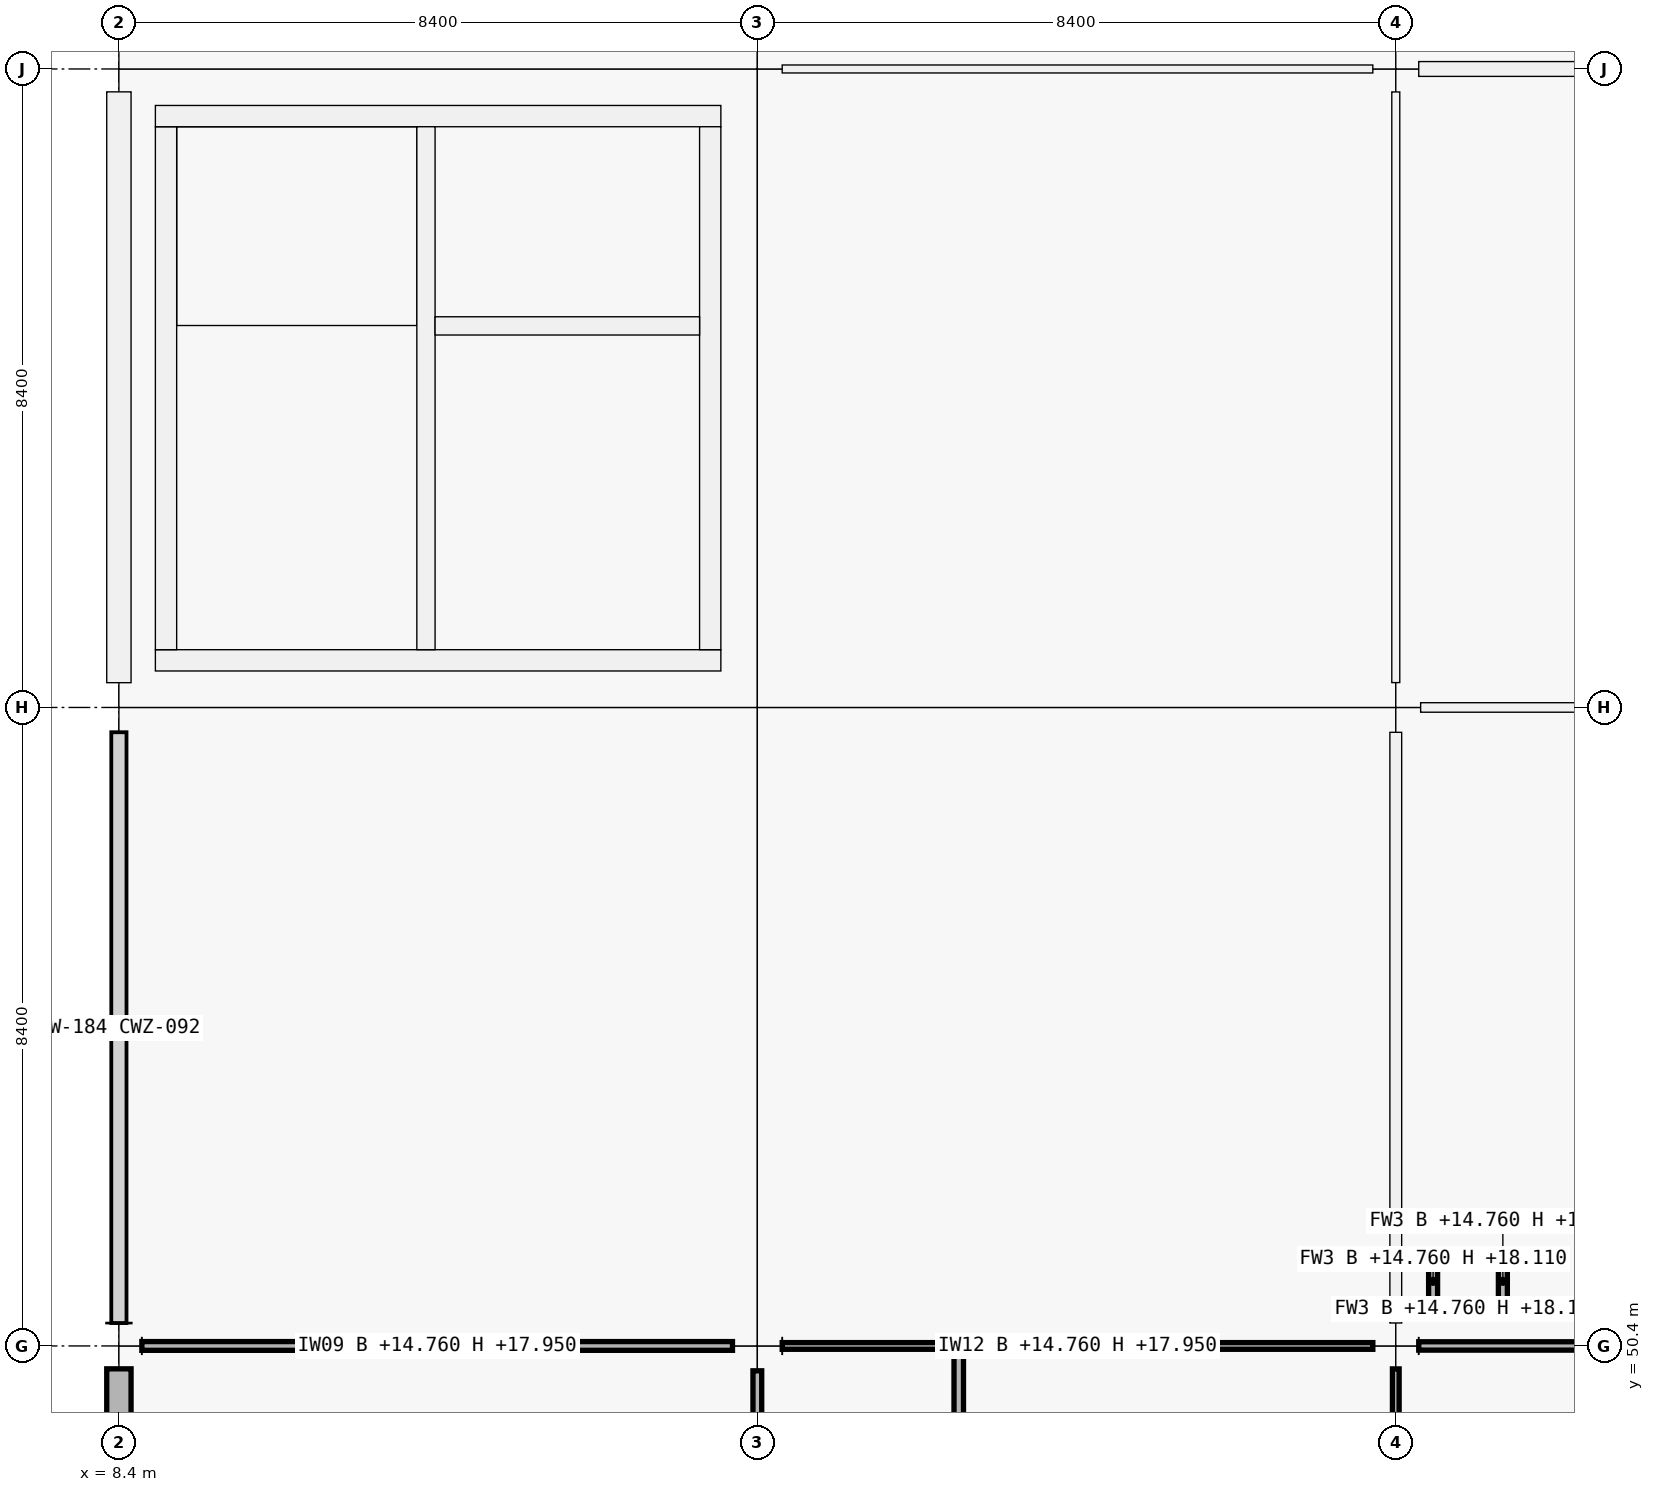
"""IFC4 building model, lengths in metres.
Left out: names, types, materials, properties, quantities, classifications, styles, units other than length and angle.
Written with IfcOpenShell. Run it as: python <this file> out.ifc"""

import sys

from ifc_helpers import new_model, si_unit, direction, frame, frame_2d, origin, origin_2d, place, context, subcontext, project, spatial, rectangle, extrude, element, fill, save


model = new_model("IFC4")
c1 = context("Model", 3, precision=1e-05, world=origin(), true_north=direction((0.0, 1.0)))
c2 = subcontext(c1, "Body", "Model", "MODEL_VIEW")
j1 = project(units=[si_unit("LENGTHUNIT", "METRE"), si_unit("PLANEANGLEUNIT", "RADIAN")], contexts=[c1])
p1 = place(None, origin())
s1 = spatial("IfcSite", under=j1, at=p1, CompositionType="ELEMENT")
p2 = place(p1, origin())
s2 = spatial("IfcBuilding", under=s1, at=p2, CompositionType="ELEMENT")
p3 = place(p2, frame((0.0, 0.0, 14.76)))
s3 = spatial("IfcBuildingStorey", under=s2, at=p3, CompositionType="ELEMENT", Elevation=14.76)
p4 = place(p3, frame((8.4, 50.4, 0.0), z_axis=(0.0, 0.0, 1.0), x_axis=(1.0, 0.0, 0.0)))
e1 = element("IfcColumn", 1, at=p4, inside=s3, PredefinedType="COLUMN", context=c2, shape_type="SweptSolid", body=[
    extrude(rectangle(XDim=0.6, YDim=0.6, at=origin_2d()), origin(), (0.0, 0.0, 1.0), 4.32),
])
p5 = place(p3, frame((8.4, 58.8, 0.0), z_axis=(0.0, 0.0, 1.0), x_axis=(1.0, 0.0, 0.0)))
e2 = element("IfcColumn", 2, at=p5, inside=s3, PredefinedType="COLUMN", context=c2, shape_type="SweptSolid", body=[
    extrude(rectangle(XDim=0.65, YDim=0.65, at=origin_2d()), origin(), (0.0, 0.0, 1.0), 4.32),
])
p6 = place(p3, frame((8.4, 67.2, 0.0), z_axis=(0.0, 0.0, 1.0), x_axis=(1.0, 0.0, 0.0)))
e3 = element("IfcColumn", 3, at=p6, inside=s3, PredefinedType="COLUMN", context=c2, shape_type="SweptSolid", body=[
    extrude(rectangle(XDim=0.6, YDim=0.6, at=origin_2d()), origin(), (0.0, 0.0, 1.0), 4.32),
])
p7 = place(p3, frame((16.8, 50.4, 0.0), z_axis=(0.0, 0.0, 1.0), x_axis=(1.0, 0.0, 0.0)))
e4 = element("IfcColumn", 4, at=p7, inside=s3, PredefinedType="COLUMN", context=c2, shape_type="SweptSolid", body=[
    extrude(rectangle(XDim=0.65, YDim=0.65, at=origin_2d()), origin(), (0.0, 0.0, 1.0), 4.32),
])
p8 = place(p3, frame((16.8, 58.8, 0.0), z_axis=(0.0, 0.0, 1.0), x_axis=(1.0, 0.0, 0.0)))
e5 = element("IfcColumn", 5, at=p8, inside=s3, PredefinedType="COLUMN", context=c2, shape_type="SweptSolid", body=[
    extrude(rectangle(XDim=0.6, YDim=0.6, at=origin_2d()), origin(), (0.0, 0.0, 1.0), 4.32),
])
p9 = place(p3, frame((16.8, 67.2, 0.0), z_axis=(0.0, 0.0, 1.0), x_axis=(1.0, 0.0, 0.0)))
e6 = element("IfcColumn", 6, at=p9, inside=s3, PredefinedType="COLUMN", context=c2, shape_type="SweptSolid", body=[
    extrude(rectangle(XDim=0.65, YDim=0.65, at=origin_2d()), origin(), (0.0, 0.0, 1.0), 4.32),
])
p10 = place(p3, frame((25.2, 50.4, 0.0), z_axis=(0.0, 0.0, 1.0), x_axis=(1.0, 0.0, 0.0)))
e7 = element("IfcColumn", 7, at=p10, inside=s3, PredefinedType="COLUMN", context=c2, shape_type="SweptSolid", body=[
    extrude(rectangle(XDim=0.6, YDim=0.6, at=origin_2d()), origin(), (0.0, 0.0, 1.0), 4.32),
])
p11 = place(p3, frame((25.2, 58.8, 0.0), z_axis=(0.0, 0.0, 1.0), x_axis=(1.0, 0.0, 0.0)))
e8 = element("IfcColumn", 8, at=p11, inside=s3, PredefinedType="COLUMN", context=c2, shape_type="SweptSolid", body=[
    extrude(rectangle(XDim=0.65, YDim=0.65, at=origin_2d()), origin(), (0.0, 0.0, 1.0), 4.32),
])
p12 = place(p3, frame((25.2, 67.2, 0.0), z_axis=(0.0, 0.0, 1.0), x_axis=(1.0, 0.0, 0.0)))
e9 = element("IfcColumn", 9, at=p12, inside=s3, PredefinedType="COLUMN", context=c2, shape_type="SweptSolid", body=[
    extrude(rectangle(XDim=0.6, YDim=0.6, at=origin_2d()), origin(), (0.0, 0.0, 1.0), 4.32),
])
p13 = place(p3, frame((8.4, 42.326, 0.0), z_axis=(0.0, 0.0, 1.0), x_axis=(0.0, 1.0, 0.0)))
e10 = element("IfcWall", 10, at=p13, inside=s3, PredefinedType="SOLIDWALL", context=c2, shape_type="SweptSolid", body=[
    extrude(rectangle(XDim=7.773, YDim=0.32, at=frame_2d((3.887, 0.0))), origin(), (0.0, 0.0, 1.0), 3.37),
])
p14 = place(p13, frame((2.536, 0.0, 0.9)))
e11 = element("IfcOpeningElement", 11, at=p14, cuts=e10, PredefinedType="OPENING", context=c2, shape_type="SweptSolid", body=[
    extrude(rectangle(XDim=2.7, YDim=1.2, at=frame_2d((1.35, 0.6))), frame((0.0, 0.16, 0.0), z_axis=(0.0, -1.0, 0.0), x_axis=(1.0, 0.0, 0.0)), (0.0, 0.0, 1.0), 0.32),
])
p15 = place(p3, frame((8.4, 59.126, 0.0), z_axis=(0.0, 0.0, 1.0), x_axis=(0.0, 1.0, 0.0)))
e12 = element("IfcWall", 12, at=p15, inside=s3, PredefinedType="SOLIDWALL", context=c2, shape_type="SweptSolid", body=[
    extrude(rectangle(XDim=7.773, YDim=0.32, at=frame_2d((3.886, 0.0))), origin(), (0.0, 0.0, 1.0), 3.37),
])
p16 = place(p3, frame((16.32, 59.42, 0.0), z_axis=(0.0, 0.0, 1.0), x_axis=(-1.0, 0.0, 0.0)))
e13 = element("IfcWall", 13, at=p16, inside=s3, PredefinedType="SHEAR", context=c2, shape_type="SweptSolid", body=[
    extrude(rectangle(XDim=7.44, YDim=0.28, at=frame_2d((3.72, 0.0))), origin(), (0.0, 0.0, 1.0), 4.32),
])
p17 = place(p16, frame((1.28, 0.0, 0.0)))
e14 = element("IfcOpeningElement", 14, at=p17, cuts=e13, PredefinedType="OPENING", context=c2, shape_type="SweptSolid", body=[
    extrude(rectangle(XDim=1.5, YDim=2.15, at=frame_2d((0.75, 1.075))), frame((0.0, 0.14, 0.0), z_axis=(0.0, -1.0, 0.0), x_axis=(1.0, 0.0, 0.0)), (0.0, 0.0, 1.0), 0.28),
])
p18 = place(p3, frame((9.02, 59.56, 0.0), z_axis=(0.0, 0.0, 1.0), x_axis=(0.0, 1.0, 0.0)))
e15 = element("IfcWall", 15, at=p18, inside=s3, PredefinedType="SHEAR", context=c2, shape_type="SweptSolid", body=[
    extrude(rectangle(XDim=6.88, YDim=0.28, at=frame_2d((3.44, 0.0))), origin(), (0.0, 0.0, 1.0), 4.32),
])
p19 = place(p3, frame((8.88, 66.58, 0.0), z_axis=(0.0, 0.0, 1.0), x_axis=(1.0, 0.0, 0.0)))
e16 = element("IfcWall", 16, at=p19, inside=s3, PredefinedType="SHEAR", context=c2, shape_type="SweptSolid", body=[
    extrude(rectangle(XDim=7.44, YDim=0.28, at=frame_2d((3.72, 0.0))), origin(), (0.0, 0.0, 1.0), 4.32),
])
p20 = place(p3, frame((16.18, 66.44, 0.0), z_axis=(0.0, 0.0, 1.0), x_axis=(0.0, -1.0, 0.0)))
e17 = element("IfcWall", 17, at=p20, inside=s3, PredefinedType="SHEAR", context=c2, shape_type="SweptSolid", body=[
    extrude(rectangle(XDim=6.88, YDim=0.28, at=frame_2d((3.44, 0.0))), origin(), (0.0, 0.0, 1.0), 4.32),
])
p21 = place(p3, frame((12.44, 59.56, 0.0), z_axis=(0.0, 0.0, 1.0), x_axis=(0.0, 1.0, 0.0)))
e18 = element("IfcWall", 18, at=p21, inside=s3, PredefinedType="SHEAR", context=c2, shape_type="SweptSolid", body=[
    extrude(rectangle(XDim=6.88, YDim=0.24, at=frame_2d((3.44, 0.0))), origin(), (0.0, 0.0, 1.0), 4.32),
])
p22 = place(p21, frame((0.12, 0.0, 0.0)))
e19 = element("IfcOpeningElement", 19, at=p22, cuts=e18, PredefinedType="OPENING", context=c2, shape_type="SweptSolid", body=[
    extrude(rectangle(XDim=1.0, YDim=2.15, at=frame_2d((0.5, 1.075))), frame((0.0, 0.12, 0.0), z_axis=(0.0, -1.0, 0.0), x_axis=(1.0, 0.0, 0.0)), (0.0, 0.0, 1.0), 0.24),
])
p23 = place(p3, frame((12.56, 63.82, 0.0), z_axis=(0.0, 0.0, 1.0), x_axis=(1.0, 0.0, 0.0)))
e20 = element("IfcWall", 20, at=p23, inside=s3, PredefinedType="SHEAR", context=c2, shape_type="SweptSolid", body=[
    extrude(rectangle(XDim=3.48, YDim=0.24, at=frame_2d((1.74, 0.0))), origin(), (0.0, 0.0, 1.0), 4.32),
])
p24 = place(p23, frame((1.19, 0.0, 0.0)))
e21 = element("IfcOpeningElement", 21, at=p24, cuts=e20, PredefinedType="OPENING", context=c2, shape_type="SweptSolid", body=[
    extrude(rectangle(XDim=1.1, YDim=2.15, at=frame_2d((0.55, 1.075))), frame((0.0, 0.12, 0.0), z_axis=(0.0, -1.0, 0.0), x_axis=(1.0, 0.0, 0.0)), (0.0, 0.0, 1.0), 0.24),
])
for number, where, z_axis, x_axis in (
    (22, (25.632, 50.891, 0.0), (0.0, 0.0, 1.0), (1.0, 0.0, 0.0)),
    (23, (25.632, 51.609, 0.0), (0.0, 0.0, 1.0), (1.0, 0.0, 0.0)),
):
    element("IfcWall", number, at=place(p3, frame(where, z_axis=z_axis, x_axis=x_axis)), inside=s3, PredefinedType="PARTITIONING", context=c2, shape_type="SweptSolid", body=[
        extrude(rectangle(XDim=1.036, YDim=0.118, at=frame_2d((0.518, 0.0))), origin(), (0.0, 0.0, 1.0), 3.35),
    ])
for number, where, z_axis, x_axis in (
    (24, (25.691, 50.95, 0.0), (0.0, 0.0, 1.0), (0.0, 1.0, 0.0)),
    (25, (26.609, 50.95, 0.0), (0.0, 0.0, 1.0), (0.0, 1.0, 0.0)),
):
    element("IfcWall", number, at=place(p3, frame(where, z_axis=z_axis, x_axis=x_axis)), inside=s3, PredefinedType="PARTITIONING", context=c2, shape_type="SweptSolid", body=[
        extrude(rectangle(XDim=0.6, YDim=0.118, at=frame_2d((0.3, 0.0))), origin(), (0.0, 0.0, 1.0), 3.35),
    ])
p25 = place(p3, frame((8.702, 50.4, 0.0), z_axis=(0.0, 0.0, 1.0), x_axis=(1.0, 0.0, 0.0)))
e26 = element("IfcWall", 26, at=p25, inside=s3, PredefinedType="PARTITIONING", context=c2, shape_type="SweptSolid", body=[
    extrude(rectangle(XDim=7.771, YDim=0.115, at=frame_2d((3.885, 0.0))), origin(), (0.0, 0.0, 1.0), 3.19),
])
p26 = place(p25, frame((3.421, 0.0, 0.0)))
e27 = element("IfcOpeningElement", 27, at=p26, cuts=e26, PredefinedType="OPENING", context=c2, shape_type="SweptSolid", body=[
    extrude(rectangle(XDim=0.93, YDim=2.12, at=frame_2d((0.465, 1.06))), frame((0.0, 0.058, 0.0), z_axis=(0.0, -1.0, 0.0), x_axis=(1.0, 0.0, 0.0)), (0.0, 0.0, 1.0), 0.115),
])
p27 = place(p3, frame((17.127, 50.4, 0.0), z_axis=(0.0, 0.0, 1.0), x_axis=(1.0, 0.0, 0.0)))
e28 = element("IfcWall", 28, at=p27, inside=s3, PredefinedType="PARTITIONING", context=c2, shape_type="SweptSolid", body=[
    extrude(rectangle(XDim=7.771, YDim=0.088, at=frame_2d((3.885, 0.0))), origin(), (0.0, 0.0, 1.0), 3.19),
])
p28 = place(p27, frame((0.658, 0.0, 0.0)))
e29 = element("IfcOpeningElement", 29, at=p28, cuts=e28, PredefinedType="OPENING", context=c2, shape_type="SweptSolid", body=[
    extrude(rectangle(XDim=0.96, YDim=2.1, at=frame_2d((0.48, 1.05))), frame((0.0, 0.044, 0.0), z_axis=(0.0, -1.0, 0.0), x_axis=(1.0, 0.0, 0.0)), (0.0, 0.0, 1.0), 0.088),
])
p29 = place(p27, frame((4.598, 0.0, 0.0)))
e30 = element("IfcOpeningElement", 30, at=p29, cuts=e28, PredefinedType="OPENING", context=c2, shape_type="SweptSolid", body=[
    extrude(rectangle(XDim=0.92, YDim=2.1, at=frame_2d((0.46, 1.05))), frame((0.0, 0.044, 0.0), z_axis=(0.0, -1.0, 0.0), x_axis=(1.0, 0.0, 0.0)), (0.0, 0.0, 1.0), 0.088),
])
p30 = place(p3, frame((17.127, 67.2, 0.0), z_axis=(0.0, 0.0, 1.0), x_axis=(1.0, 0.0, 0.0)))
e31 = element("IfcWall", 31, at=p30, inside=s3, PredefinedType="PARTITIONING", context=c2, shape_type="SweptSolid", body=[
    extrude(rectangle(XDim=7.771, YDim=0.105, at=frame_2d((3.885, 0.0))), origin(), (0.0, 0.0, 1.0), 3.19),
])
p31 = place(p30, frame((3.356, 0.0, 0.0)))
e32 = element("IfcOpeningElement", 32, at=p31, cuts=e31, PredefinedType="OPENING", context=c2, shape_type="SweptSolid", body=[
    extrude(rectangle(XDim=1.06, YDim=2.25, at=frame_2d((0.53, 1.125))), frame((0.0, 0.052, 0.0), z_axis=(0.0, -1.0, 0.0), x_axis=(1.0, 0.0, 0.0)), (0.0, 0.0, 1.0), 0.105),
])
p32 = place(p3, frame((25.502, 50.4, 0.0), z_axis=(0.0, 0.0, 1.0), x_axis=(1.0, 0.0, 0.0)))
e33 = element("IfcWall", 33, at=p32, inside=s3, PredefinedType="MOVABLE", context=c2, shape_type="SweptSolid", body=[
    extrude(rectangle(XDim=7.771, YDim=0.11, at=frame_2d((3.885, 0.0))), origin(), (0.0, 0.0, 1.0), 3.19),
])
p33 = place(p32, frame((3.381, 0.0, 0.0)))
e34 = element("IfcOpeningElement", 34, at=p33, cuts=e33, PredefinedType="OPENING", context=c2, shape_type="SweptSolid", body=[
    extrude(rectangle(XDim=1.01, YDim=2.12, at=frame_2d((0.505, 1.06))), frame((0.0, 0.055, 0.0), z_axis=(0.0, -1.0, 0.0), x_axis=(1.0, 0.0, 0.0)), (0.0, 0.0, 1.0), 0.11),
])
p34 = place(p3, frame((25.527, 58.8, 0.0), z_axis=(0.0, 0.0, 1.0), x_axis=(1.0, 0.0, 0.0)))
e35 = element("IfcWall", 35, at=p34, inside=s3, PredefinedType="PARTITIONING", context=c2, shape_type="SweptSolid", body=[
    extrude(rectangle(XDim=7.771, YDim=0.125, at=frame_2d((3.885, 0.0))), origin(), (0.0, 0.0, 1.0), 3.19),
])
p35 = place(p34, frame((3.401, 0.0, 0.0)))
e36 = element("IfcOpeningElement", 36, at=p35, cuts=e35, PredefinedType="OPENING", context=c2, shape_type="SweptSolid", body=[
    extrude(rectangle(XDim=0.97, YDim=2.12, at=frame_2d((0.485, 1.06))), frame((0.0, 0.062, 0.0), z_axis=(0.0, -1.0, 0.0), x_axis=(1.0, 0.0, 0.0)), (0.0, 0.0, 1.0), 0.125),
])
p36 = place(p3, frame((25.502, 67.2, 0.0), z_axis=(0.0, 0.0, 1.0), x_axis=(1.0, 0.0, 0.0)))
e37 = element("IfcWall", 37, at=p36, inside=s3, PredefinedType="PARTITIONING", context=c2, shape_type="SweptSolid", body=[
    extrude(rectangle(XDim=7.771, YDim=0.195, at=frame_2d((3.885, 0.0))), origin(), (0.0, 0.0, 1.0), 3.19),
])
p37 = place(p36, frame((3.401, 0.0, 0.0)))
e38 = element("IfcOpeningElement", 38, at=p37, cuts=e37, PredefinedType="OPENING", context=c2, shape_type="SweptSolid", body=[
    extrude(rectangle(XDim=0.97, YDim=2.12, at=frame_2d((0.485, 1.06))), frame((0.0, 0.098, 0.0), z_axis=(0.0, -1.0, 0.0), x_axis=(1.0, 0.0, 0.0)), (0.0, 0.0, 1.0), 0.195),
])
p38 = place(p3, frame((16.8, 42.302, 0.0), z_axis=(0.0, 0.0, 1.0), x_axis=(0.0, 1.0, 0.0)))
e39 = element("IfcWall", 39, at=p38, inside=s3, PredefinedType="PARTITIONING", context=c2, shape_type="SweptSolid", body=[
    extrude(rectangle(XDim=7.771, YDim=0.115, at=frame_2d((3.885, 0.0))), origin(), (0.0, 0.0, 1.0), 3.19),
])
p39 = place(p3, frame((25.2, 42.327, 0.0), z_axis=(0.0, 0.0, 1.0), x_axis=(0.0, 1.0, 0.0)))
e40 = element("IfcWall", 40, at=p39, inside=s3, PredefinedType="PARTITIONING", context=c2, shape_type="SweptSolid", body=[
    extrude(rectangle(XDim=7.771, YDim=0.088, at=frame_2d((3.885, 0.0))), origin(), (0.0, 0.0, 1.0), 3.19),
])
p40 = place(p3, frame((25.2, 50.702, 0.0), z_axis=(0.0, 0.0, 1.0), x_axis=(0.0, 1.0, 0.0)))
e41 = element("IfcWall", 41, at=p40, inside=s3, PredefinedType="PARTITIONING", context=c2, shape_type="SweptSolid", body=[
    extrude(rectangle(XDim=7.771, YDim=0.155, at=frame_2d((3.885, 0.0))), origin(), (0.0, 0.0, 1.0), 3.19),
])
p41 = place(p40, frame((3.385, 0.0, 0.0)))
e42 = element("IfcOpeningElement", 42, at=p41, cuts=e41, PredefinedType="OPENING", context=c2, shape_type="SweptSolid", body=[
    extrude(rectangle(XDim=1.0, YDim=2.2, at=frame_2d((0.5, 1.1))), frame((0.0, 0.078, 0.0), z_axis=(0.0, -1.0, 0.0), x_axis=(1.0, 0.0, 0.0)), (0.0, 0.0, 1.0), 0.155),
])
p42 = place(p3, frame((25.2, 59.127, 0.0), z_axis=(0.0, 0.0, 1.0), x_axis=(0.0, 1.0, 0.0)))
e43 = element("IfcWall", 43, at=p42, inside=s3, PredefinedType="PARTITIONING", context=c2, shape_type="SweptSolid", body=[
    extrude(rectangle(XDim=7.771, YDim=0.105, at=frame_2d((3.885, 0.0))), origin(), (0.0, 0.0, 1.0), 3.19),
])
p43 = place(p42, frame((3.396, 0.0, 0.0)))
e44 = element("IfcOpeningElement", 44, at=p43, cuts=e43, PredefinedType="OPENING", context=c2, shape_type="SweptSolid", body=[
    extrude(rectangle(XDim=0.98, YDim=2.18, at=frame_2d((0.49, 1.09))), frame((0.0, 0.052, 0.0), z_axis=(0.0, -1.0, 0.0), x_axis=(1.0, 0.0, 0.0)), (0.0, 0.0, 1.0), 0.105),
])
p44 = place(p3, frame((19.45, 42.07, 0.0), z_axis=(0.0, 0.0, 1.0), x_axis=(0.0, 1.0, 0.0)))
e45 = element("IfcWall", 45, at=p44, inside=s3, PredefinedType="PARTITIONING", context=c2, shape_type="SweptSolid", body=[
    extrude(rectangle(XDim=8.284, YDim=0.125, at=frame_2d((4.142, 0.0))), origin(), (0.0, 0.0, 1.0), 3.19),
])
p45 = place(p22, origin())
e46 = element("IfcDoor", 46, at=p45, inside=s3, OperationType="SINGLE_SWING_LEFT", PredefinedType="DOOR", context=c2, shape_type="SweptSolid", body=[
    extrude(rectangle(XDim=1.0, YDim=2.15, at=frame_2d((0.5, 1.075))), frame((0.0, 0.025, 0.0), z_axis=(0.0, -1.0, 0.0), x_axis=(1.0, 0.0, 0.0)), (0.0, 0.0, 1.0), 0.05),
])
fill(e19, e46)
p46 = place(p17, origin())
e47 = element("IfcDoor", 47, at=p46, inside=s3, OperationType="DOUBLE_DOOR_SINGLE_SWING", PredefinedType="DOOR", context=c2, shape_type="SweptSolid", body=[
    extrude(rectangle(XDim=1.5, YDim=2.15, at=frame_2d((0.75, 1.075))), frame((0.0, 0.025, 0.0), z_axis=(0.0, -1.0, 0.0), x_axis=(1.0, 0.0, 0.0)), (0.0, 0.0, 1.0), 0.05),
])
fill(e14, e47)
p47 = place(p24, origin())
e48 = element("IfcDoor", 48, at=p47, inside=s3, OperationType="DOUBLE_DOOR_SLIDING", PredefinedType="DOOR", context=c2, shape_type="SweptSolid", body=[
    extrude(rectangle(XDim=1.1, YDim=2.15, at=frame_2d((0.55, 1.075))), frame((0.0, 0.025, 0.0), z_axis=(0.0, -1.0, 0.0), x_axis=(1.0, 0.0, 0.0)), (0.0, 0.0, 1.0), 0.05),
])
fill(e21, e48)
p48 = place(p28, origin())
e49 = element("IfcDoor", 49, at=p48, inside=s3, OperationType="SINGLE_SWING_RIGHT", PredefinedType="DOOR", context=c2, shape_type="SweptSolid", body=[
    extrude(rectangle(XDim=0.96, YDim=2.1, at=frame_2d((0.48, 1.05))), frame((0.0, 0.025, 0.0), z_axis=(0.0, -1.0, 0.0), x_axis=(1.0, 0.0, 0.0)), (0.0, 0.0, 1.0), 0.05),
])
fill(e29, e49)
p49 = place(p29, origin())
e50 = element("IfcDoor", 50, at=p49, inside=s3, OperationType="SINGLE_SWING_LEFT", PredefinedType="DOOR", context=c2, shape_type="SweptSolid", body=[
    extrude(rectangle(XDim=0.92, YDim=2.1, at=frame_2d((0.46, 1.05))), frame((0.0, 0.025, 0.0), z_axis=(0.0, -1.0, 0.0), x_axis=(1.0, 0.0, 0.0)), (0.0, 0.0, 1.0), 0.05),
])
fill(e30, e50)
p50 = place(p26, origin())
e51 = element("IfcDoor", 51, at=p50, inside=s3, OperationType="SINGLE_SWING_LEFT", PredefinedType="DOOR", context=c2, shape_type="SweptSolid", body=[
    extrude(rectangle(XDim=0.93, YDim=2.12, at=frame_2d((0.465, 1.06))), frame((0.0, 0.025, 0.0), z_axis=(0.0, -1.0, 0.0), x_axis=(1.0, 0.0, 0.0)), (0.0, 0.0, 1.0), 0.05),
])
fill(e27, e51)
p51 = place(p31, origin())
e52 = element("IfcDoor", 52, at=p51, inside=s3, OperationType="SINGLE_SWING_LEFT", PredefinedType="DOOR", context=c2, shape_type="SweptSolid", body=[
    extrude(rectangle(XDim=1.06, YDim=2.25, at=frame_2d((0.53, 1.125))), frame((0.0, 0.025, 0.0), z_axis=(0.0, -1.0, 0.0), x_axis=(1.0, 0.0, 0.0)), (0.0, 0.0, 1.0), 0.05),
])
fill(e32, e52)
p52 = place(p41, origin())
e53 = element("IfcDoor", 53, at=p52, inside=s3, OperationType="SINGLE_SWING_LEFT", PredefinedType="DOOR", context=c2, shape_type="SweptSolid", body=[
    extrude(rectangle(XDim=1.0, YDim=2.2, at=frame_2d((0.5, 1.1))), frame((0.0, 0.025, 0.0), z_axis=(0.0, -1.0, 0.0), x_axis=(1.0, 0.0, 0.0)), (0.0, 0.0, 1.0), 0.05),
])
fill(e42, e53)
p53 = place(p43, origin())
e54 = element("IfcDoor", 54, at=p53, inside=s3, OperationType="SINGLE_SWING_RIGHT", PredefinedType="DOOR", context=c2, shape_type="SweptSolid", body=[
    extrude(rectangle(XDim=0.98, YDim=2.18, at=frame_2d((0.49, 1.09))), frame((0.0, 0.025, 0.0), z_axis=(0.0, -1.0, 0.0), x_axis=(1.0, 0.0, 0.0)), (0.0, 0.0, 1.0), 0.05),
])
fill(e44, e54)
save(model, sys.argv[1])
